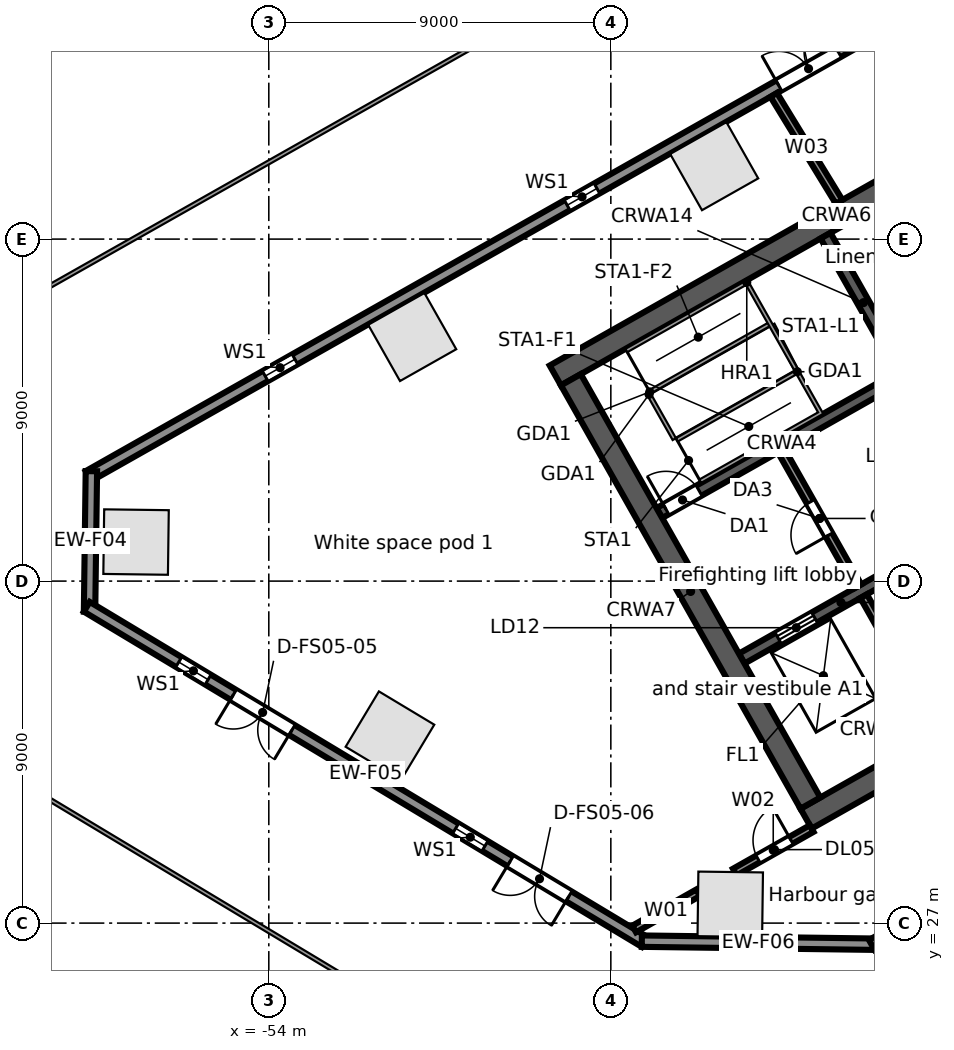
"""IFC4 building model, lengths in metres.
Left out: names, types, materials, properties, quantities, classifications, styles, units other than length and angle.
Written with IfcOpenShell. Run it as: python <this file> out.ifc"""

import sys

from ifc_helpers import new_model, si_unit, direction, frame, frame_2d, origin, origin_2d, place, context, subcontext, project, spatial, rectangle, extrude, element, fill, save


model = new_model("IFC4")
c1 = context("Model", 3, precision=1e-05, world=origin(), true_north=direction((0.0, 1.0)))
c2 = subcontext(c1, "Body", "Model", "MODEL_VIEW")
j1 = project(units=[si_unit("LENGTHUNIT", "METRE"), si_unit("PLANEANGLEUNIT", "RADIAN")], contexts=[c1])
p1 = place(None, origin())
s1 = spatial("IfcSite", under=j1, at=p1, CompositionType="ELEMENT")
p2 = place(p1, origin())
s2 = spatial("IfcBuilding", under=s1, at=p2, CompositionType="ELEMENT")
p3 = place(p2, frame((0.0, 0.0, 26.5)))
s3 = spatial("IfcBuildingStorey", under=s2, at=p3, CompositionType="ELEMENT", Elevation=26.5)
for number, where, z_axis, x_axis in (
    (1, (-42.28, 46.919, 0.0), (0.0, 0.0, 1.0), (-0.87, -0.492, 0.0)),
    (2, (-50.226, 42.423, 0.0), (0.0, 0.0, 1.0), (-0.87, -0.492, 0.0)),
    (3, (-57.493, 37.027, 0.0), (0.0, 0.0, 1.0), (-0.013, -1.0, 0.0)),
    (4, (-50.812, 31.931, 0.0), (0.0, 0.0, 1.0), (0.857, -0.515, 0.0)),
    (5, (-41.858, 27.495, 0.0), (0.0, 0.0, 1.0), (1.0, -0.013, 0.0)),
):
    element("IfcColumn", number, at=place(p3, frame(where, z_axis=z_axis, x_axis=x_axis)), inside=s3, PredefinedType="COLUMN", context=c2, shape_type="SweptSolid", body=[
        extrude(rectangle(XDim=1.7, YDim=1.7, at=origin_2d()), origin(), (0.0, 0.0, 1.0), 5.0),
    ])
p4 = place(p3, frame((-58.745, 38.764, 0.0), z_axis=(0.0, 0.0, 1.0), x_axis=(0.870355811726, 0.492423355453, 0.0)))
e6 = element("IfcWall", 6, at=p4, inside=s3, PredefinedType="STANDARD", context=c2, shape_type="SweptSolid", body=[
    extrude(rectangle(XDim=64.025, YDim=0.3, at=frame_2d((32.013, 0.0))), origin(), (0.0, 0.0, 1.0), 4.68),
])
p5 = place(p4, frame((60.122, 0.0, 0.6)))
e7 = element("IfcOpeningElement", 7, at=p5, cuts=e6, PredefinedType="OPENING", context=c2, shape_type="SweptSolid", body=[
    extrude(rectangle(XDim=0.9, YDim=3.2, at=frame_2d((0.45, 1.6))), frame((0.0, 0.16, 0.0), z_axis=(0.0, -1.0, 0.0), x_axis=(1.0, 0.0, 0.0)), (0.0, 0.0, 1.0), 0.32),
])
p6 = place(p4, frame((50.992, 0.0, 0.6)))
e8 = element("IfcOpeningElement", 8, at=p6, cuts=e6, PredefinedType="OPENING", context=c2, shape_type="SweptSolid", body=[
    extrude(rectangle(XDim=0.9, YDim=3.2, at=frame_2d((0.45, 1.6))), frame((0.0, 0.16, 0.0), z_axis=(0.0, -1.0, 0.0), x_axis=(1.0, 0.0, 0.0)), (0.0, 0.0, 1.0), 0.32),
])
p7 = place(p4, frame((41.862, 0.0, 0.6)))
e9 = element("IfcOpeningElement", 9, at=p7, cuts=e6, PredefinedType="OPENING", context=c2, shape_type="SweptSolid", body=[
    extrude(rectangle(XDim=0.9, YDim=3.2, at=frame_2d((0.45, 1.6))), frame((0.0, 0.16, 0.0), z_axis=(0.0, -1.0, 0.0), x_axis=(1.0, 0.0, 0.0)), (0.0, 0.0, 1.0), 0.32),
])
p8 = place(p4, frame((39.129, 0.0, 0.0)))
e10 = element("IfcOpeningElement", 10, at=p8, cuts=e6, PredefinedType="OPENING", context=c2, shape_type="SweptSolid", body=[
    extrude(rectangle(XDim=1.8, YDim=2.4, at=frame_2d((0.9, 1.2))), frame((0.0, 0.16, 0.0), z_axis=(0.0, -1.0, 0.0), x_axis=(1.0, 0.0, 0.0)), (0.0, 0.0, 1.0), 0.32),
])
p9 = place(p4, frame((32.732, 0.0, 0.6)))
e11 = element("IfcOpeningElement", 11, at=p9, cuts=e6, PredefinedType="OPENING", context=c2, shape_type="SweptSolid", body=[
    extrude(rectangle(XDim=0.9, YDim=3.2, at=frame_2d((0.45, 1.6))), frame((0.0, 0.16, 0.0), z_axis=(0.0, -1.0, 0.0), x_axis=(1.0, 0.0, 0.0)), (0.0, 0.0, 1.0), 0.32),
])
p10 = place(p4, frame((23.602, 0.0, 0.6)))
e12 = element("IfcOpeningElement", 12, at=p10, cuts=e6, PredefinedType="OPENING", context=c2, shape_type="SweptSolid", body=[
    extrude(rectangle(XDim=0.9, YDim=3.2, at=frame_2d((0.45, 1.6))), frame((0.0, 0.16, 0.0), z_axis=(0.0, -1.0, 0.0), x_axis=(1.0, 0.0, 0.0)), (0.0, 0.0, 1.0), 0.32),
])
p11 = place(p4, frame((20.87, 0.0, 0.0)))
e13 = element("IfcOpeningElement", 13, at=p11, cuts=e6, PredefinedType="OPENING", context=c2, shape_type="SweptSolid", body=[
    extrude(rectangle(XDim=1.8, YDim=2.4, at=frame_2d((0.9, 1.2))), frame((0.0, 0.16, 0.0), z_axis=(0.0, -1.0, 0.0), x_axis=(1.0, 0.0, 0.0)), (0.0, 0.0, 1.0), 0.32),
])
p12 = place(p4, frame((14.472, 0.0, 0.6)))
e14 = element("IfcOpeningElement", 14, at=p12, cuts=e6, PredefinedType="OPENING", context=c2, shape_type="SweptSolid", body=[
    extrude(rectangle(XDim=0.9, YDim=3.2, at=frame_2d((0.45, 1.6))), frame((0.0, 0.16, 0.0), z_axis=(0.0, -1.0, 0.0), x_axis=(1.0, 0.0, 0.0)), (0.0, 0.0, 1.0), 0.32),
])
p13 = place(p4, frame((5.342, 0.0, 0.6)))
e15 = element("IfcOpeningElement", 15, at=p13, cuts=e6, PredefinedType="OPENING", context=c2, shape_type="SweptSolid", body=[
    extrude(rectangle(XDim=0.9, YDim=3.2, at=frame_2d((0.45, 1.6))), frame((0.0, 0.16, 0.0), z_axis=(0.0, -1.0, 0.0), x_axis=(1.0, 0.0, 0.0)), (0.0, 0.0, 1.0), 0.32),
])
p14 = place(p3, frame((-58.717, 35.194, 0.0), z_axis=(0.0, 0.0, 1.0), x_axis=(0.013069053407, 0.999914596275, 0.0)))
e16 = element("IfcWall", 16, at=p14, inside=s3, PredefinedType="STANDARD", context=c2, shape_type="SweptSolid", body=[
    extrude(rectangle(XDim=3.699, YDim=0.3, at=frame_2d((1.849, 0.0))), origin(), (0.0, 0.0, 1.0), 4.68),
])
p15 = place(p3, frame((-44.109, 26.504, 0.0), z_axis=(0.0, 0.0, 1.0), x_axis=(-0.857169502585, 0.515034410344, 0.0)))
e17 = element("IfcWall", 17, at=p15, inside=s3, PredefinedType="STANDARD", context=c2, shape_type="SweptSolid", body=[
    extrude(rectangle(XDim=17.127, YDim=0.3, at=frame_2d((8.563, 0.0))), origin(), (0.0, 0.0, 1.0), 4.68),
])
p16 = place(p15, frame((13.403, 0.0, 0.6)))
e18 = element("IfcOpeningElement", 18, at=p16, cuts=e17, PredefinedType="OPENING", context=c2, shape_type="SweptSolid", body=[
    extrude(rectangle(XDim=0.9, YDim=3.2, at=frame_2d((0.45, 1.6))), frame((0.0, 0.16, 0.0), z_axis=(0.0, -1.0, 0.0), x_axis=(1.0, 0.0, 0.0)), (0.0, 0.0, 1.0), 0.32),
])
p17 = place(p15, frame((10.828, 0.0, 0.0)))
e19 = element("IfcOpeningElement", 19, at=p17, cuts=e17, PredefinedType="OPENING", context=c2, shape_type="SweptSolid", body=[
    extrude(rectangle(XDim=1.8, YDim=2.4, at=frame_2d((0.9, 1.2))), frame((0.0, 0.16, 0.0), z_axis=(0.0, -1.0, 0.0), x_axis=(1.0, 0.0, 0.0)), (0.0, 0.0, 1.0), 0.32),
])
p18 = place(p15, frame((4.903, 0.0, 0.6)))
e20 = element("IfcOpeningElement", 20, at=p18, cuts=e17, PredefinedType="OPENING", context=c2, shape_type="SweptSolid", body=[
    extrude(rectangle(XDim=0.9, YDim=3.2, at=frame_2d((0.45, 1.6))), frame((0.0, 0.16, 0.0), z_axis=(0.0, -1.0, 0.0), x_axis=(1.0, 0.0, 0.0)), (0.0, 0.0, 1.0), 0.32),
])
p19 = place(p15, frame((2.328, 0.0, 0.0)))
e21 = element("IfcOpeningElement", 21, at=p19, cuts=e17, PredefinedType="OPENING", context=c2, shape_type="SweptSolid", body=[
    extrude(rectangle(XDim=1.8, YDim=2.4, at=frame_2d((0.9, 1.2))), frame((0.0, 0.16, 0.0), z_axis=(0.0, -1.0, 0.0), x_axis=(1.0, 0.0, 0.0)), (0.0, 0.0, 1.0), 0.32),
])
p20 = place(p3, frame((-38.057, 26.445, 0.0), z_axis=(0.0, 0.0, 1.0), x_axis=(-0.999914086342, 0.013108010296, 0.0)))
e22 = element("IfcWall", 22, at=p20, inside=s3, PredefinedType="STANDARD", context=c2, shape_type="SweptSolid", body=[
    extrude(rectangle(XDim=6.128, YDim=0.3, at=frame_2d((3.064, 0.0))), origin(), (0.0, 0.0, 1.0), 4.68),
])
p21 = place(p3, frame((-0.055, 47.969, 0.0), z_axis=(0.0, 0.0, 1.0), x_axis=(-0.870355730478, -0.492423499058, 0.0)))
e23 = element("IfcWall", 23, at=p21, inside=s3, PredefinedType="STANDARD", context=c2, shape_type="SweptSolid", body=[
    extrude(rectangle(XDim=43.75, YDim=0.3, at=frame_2d((21.875, 0.0))), origin(), (0.0, 0.0, 1.0), 4.68),
])
p22 = place(p21, frame((39.977, 0.0, 0.6)))
e24 = element("IfcOpeningElement", 24, at=p22, cuts=e23, PredefinedType="OPENING", context=c2, shape_type="SweptSolid", body=[
    extrude(rectangle(XDim=0.9, YDim=3.2, at=frame_2d((0.45, 1.6))), frame((0.0, 0.16, 0.0), z_axis=(0.0, -1.0, 0.0), x_axis=(1.0, 0.0, 0.0)), (0.0, 0.0, 1.0), 0.32),
])
p23 = place(p21, frame((31.222, 0.0, 0.6)))
e25 = element("IfcOpeningElement", 25, at=p23, cuts=e23, PredefinedType="OPENING", context=c2, shape_type="SweptSolid", body=[
    extrude(rectangle(XDim=0.9, YDim=3.2, at=frame_2d((0.45, 1.6))), frame((0.0, 0.16, 0.0), z_axis=(0.0, -1.0, 0.0), x_axis=(1.0, 0.0, 0.0)), (0.0, 0.0, 1.0), 0.32),
])
p24 = place(p21, frame((28.584, 0.0, 0.0)))
e26 = element("IfcOpeningElement", 26, at=p24, cuts=e23, PredefinedType="OPENING", context=c2, shape_type="SweptSolid", body=[
    extrude(rectangle(XDim=1.8, YDim=2.4, at=frame_2d((0.9, 1.2))), frame((0.0, 0.16, 0.0), z_axis=(0.0, -1.0, 0.0), x_axis=(1.0, 0.0, 0.0)), (0.0, 0.0, 1.0), 0.32),
])
p25 = place(p21, frame((22.468, 0.0, 0.6)))
e27 = element("IfcOpeningElement", 27, at=p25, cuts=e23, PredefinedType="OPENING", context=c2, shape_type="SweptSolid", body=[
    extrude(rectangle(XDim=0.9, YDim=3.2, at=frame_2d((0.45, 1.6))), frame((0.0, 0.16, 0.0), z_axis=(0.0, -1.0, 0.0), x_axis=(1.0, 0.0, 0.0)), (0.0, 0.0, 1.0), 0.32),
])
p26 = place(p21, frame((13.713, 0.0, 0.6)))
e28 = element("IfcOpeningElement", 28, at=p26, cuts=e23, PredefinedType="OPENING", context=c2, shape_type="SweptSolid", body=[
    extrude(rectangle(XDim=0.9, YDim=3.2, at=frame_2d((0.45, 1.6))), frame((0.0, 0.16, 0.0), z_axis=(0.0, -1.0, 0.0), x_axis=(1.0, 0.0, 0.0)), (0.0, 0.0, 1.0), 0.32),
])
p27 = place(p21, frame((11.075, 0.0, 0.0)))
e29 = element("IfcOpeningElement", 29, at=p27, cuts=e23, PredefinedType="OPENING", context=c2, shape_type="SweptSolid", body=[
    extrude(rectangle(XDim=1.8, YDim=2.4, at=frame_2d((0.9, 1.2))), frame((0.0, 0.16, 0.0), z_axis=(0.0, -1.0, 0.0), x_axis=(1.0, 0.0, 0.0)), (0.0, 0.0, 1.0), 0.32),
])
p28 = place(p21, frame((4.959, 0.0, 0.6)))
e30 = element("IfcOpeningElement", 30, at=p28, cuts=e23, PredefinedType="OPENING", context=c2, shape_type="SweptSolid", body=[
    extrude(rectangle(XDim=0.9, YDim=3.2, at=frame_2d((0.45, 1.6))), frame((0.0, 0.16, 0.0), z_axis=(0.0, -1.0, 0.0), x_axis=(1.0, 0.0, 0.0)), (0.0, 0.0, 1.0), 0.32),
])
p29 = place(p3, frame((-39.862, 29.749, 0.0), z_axis=(0.0, 0.0, 1.0), x_axis=(0.870350116061, 0.492433422375, 0.0)))
e31 = element("IfcWall", 31, at=p29, inside=s3, PredefinedType="SOLIDWALL", context=c2, shape_type="SweptSolid", body=[
    extrude(rectangle(XDim=17.0, YDim=0.6, at=frame_2d((8.5, 0.0))), origin(), (0.0, 0.0, 1.0), 4.68),
])
p30 = place(p29, frame((7.2, 0.0, 0.0)))
e32 = element("IfcOpeningElement", 32, at=p30, cuts=e31, PredefinedType="OPENING", context=c2, shape_type="SweptSolid", body=[
    extrude(rectangle(XDim=1.2, YDim=2.1, at=frame_2d((0.6, 1.05))), frame((0.0, 0.31, 0.0), z_axis=(0.0, -1.0, 0.0), x_axis=(1.0, 0.0, 0.0)), (0.0, 0.0, 1.0), 0.62),
])
p31 = place(p3, frame((-41.556, 33.961, 0.0), z_axis=(0.0, 0.0, 1.0), x_axis=(0.870343731308, 0.492444706919, 0.0)))
e33 = element("IfcWall", 33, at=p31, inside=s3, PredefinedType="SOLIDWALL", context=c2, shape_type="SweptSolid", body=[
    extrude(rectangle(XDim=6.0, YDim=0.3, at=frame_2d((3.0, 0.0))), origin(), (0.0, 0.0, 1.0), 4.68),
])
p32 = place(p31, frame((1.1, 0.0, 0.0)))
e34 = element("IfcOpeningElement", 34, at=p32, cuts=e33, PredefinedType="OPENING", context=c2, shape_type="SweptSolid", body=[
    extrude(rectangle(XDim=1.1, YDim=2.1, at=frame_2d((0.55, 1.05))), frame((0.0, 0.16, 0.0), z_axis=(0.0, -1.0, 0.0), x_axis=(1.0, 0.0, 0.0)), (0.0, 0.0, 1.0), 0.32),
])
p33 = place(p31, frame((4.25, 0.0, 0.0)))
e35 = element("IfcOpeningElement", 35, at=p33, cuts=e33, PredefinedType="OPENING", context=c2, shape_type="SweptSolid", body=[
    extrude(rectangle(XDim=1.1, YDim=2.1, at=frame_2d((0.55, 1.05))), frame((0.0, 0.16, 0.0), z_axis=(0.0, -1.0, 0.0), x_axis=(1.0, 0.0, 0.0)), (0.0, 0.0, 1.0), 0.32),
])
p34 = place(p3, frame((-43.723, 37.791, 0.0), z_axis=(0.0, 0.0, 1.0), x_axis=(0.87035077051, 0.49243226567, 0.0)))
e36 = element("IfcWall", 36, at=p34, inside=s3, PredefinedType="SOLIDWALL", context=c2, shape_type="SweptSolid", body=[
    extrude(rectangle(XDim=7.4, YDim=0.3, at=frame_2d((3.7, 0.0))), origin(), (0.0, 0.0, 1.0), 4.68),
])
p35 = place(p34, frame((0.2, 0.0, 0.0)))
e37 = element("IfcOpeningElement", 37, at=p35, cuts=e36, PredefinedType="OPENING", context=c2, shape_type="SweptSolid", body=[
    extrude(rectangle(XDim=1.0, YDim=2.1, at=frame_2d((0.5, 1.05))), frame((0.0, 0.16, 0.0), z_axis=(0.0, -1.0, 0.0), x_axis=(1.0, 0.0, 0.0)), (0.0, 0.0, 1.0), 0.32),
])
p36 = place(p3, frame((-46.461, 41.412, 0.0), z_axis=(0.0, 0.0, 1.0), x_axis=(0.870350116061, 0.492433422375, 0.0)))
e38 = element("IfcWall", 38, at=p36, inside=s3, PredefinedType="SOLIDWALL", context=c2, shape_type="SweptSolid", body=[
    extrude(rectangle(XDim=17.0, YDim=0.6, at=frame_2d((8.5, 0.0))), origin(), (0.0, 0.0, 1.0), 4.68),
])
p37 = place(p3, frame((-46.052, 41.298, 0.0), z_axis=(0.0, 0.0, 1.0), x_axis=(0.492418598281, -0.870358503186, 0.0)))
e39 = element("IfcWall", 39, at=p37, inside=s3, PredefinedType="SOLIDWALL", context=c2, shape_type="SweptSolid", body=[
    extrude(rectangle(XDim=12.8, YDim=0.6, at=frame_2d((6.4, 0.0))), origin(), (0.0, 0.0, 1.0), 4.68),
])
p38 = place(p3, frame((-38.349, 35.603, 0.0), z_axis=(0.0, 0.0, 1.0), x_axis=(0.49241474071, -0.870360685654, 0.0)))
e40 = element("IfcWall", 40, at=p38, inside=s3, PredefinedType="SOLIDWALL", context=c2, shape_type="SweptSolid", body=[
    extrude(rectangle(XDim=4.05, YDim=0.2, at=frame_2d((2.025, 0.0))), origin(), (0.0, 0.0, 1.0), 4.68),
])
p39 = place(p3, frame((-40.516, 39.433, 0.0), z_axis=(0.0, 0.0, 1.0), x_axis=(0.492453559952, -0.87033872216, 0.0)))
e41 = element("IfcWall", 41, at=p39, inside=s3, PredefinedType="PARTITIONING", context=c2, shape_type="SweptSolid", body=[
    extrude(rectangle(XDim=4.1, YDim=0.2, at=frame_2d((2.05, 0.0))), origin(), (0.0, 0.0, 1.0), 4.68),
])
p40 = place(p39, frame((1.55, 0.0, 0.0)))
e42 = element("IfcOpeningElement", 42, at=p40, cuts=e41, PredefinedType="OPENING", context=c2, shape_type="SweptSolid", body=[
    extrude(rectangle(XDim=1.0, YDim=2.1, at=frame_2d((0.5, 1.05))), frame((0.0, 0.11, 0.0), z_axis=(0.0, -1.0, 0.0), x_axis=(1.0, 0.0, 0.0)), (0.0, 0.0, 1.0), 0.22),
])
p41 = place(p3, frame((-39.35, 45.09, 0.0), z_axis=(0.0, 0.0, 1.0), x_axis=(0.49241474071, -0.870360685654, 0.0)))
e43 = element("IfcWall", 43, at=p41, inside=s3, PredefinedType="SOLIDWALL", context=c2, shape_type="SweptSolid", body=[
    extrude(rectangle(XDim=4.05, YDim=0.3, at=frame_2d((2.025, 0.0))), origin(), (0.0, 0.0, 1.0), 4.68),
])
p42 = place(p3, frame((-44.386, 26.845, 0.0), z_axis=(0.0, 0.0, 1.0), x_axis=(0.870226201187, 0.492652371118, 0.0)))
e44 = element("IfcWall", 44, at=p42, inside=s3, PredefinedType="PARTITIONING", context=c2, shape_type="SweptSolid", body=[
    extrude(rectangle(XDim=1.933, YDim=0.2, at=frame_2d((0.966, 0.0))), origin(), (0.0, 0.0, 1.0), 4.68),
])
p43 = place(p3, frame((-41.738, 28.343, 0.0), z_axis=(0.0, 0.0, 1.0), x_axis=(0.870265350095, 0.492583211676, 0.0)))
e45 = element("IfcWall", 45, at=p43, inside=s3, PredefinedType="PARTITIONING", context=c2, shape_type="SweptSolid", body=[
    extrude(rectangle(XDim=2.324, YDim=0.2, at=frame_2d((1.162, 0.0))), origin(), (0.0, 0.0, 1.0), 4.68),
])
p44 = place(p43, frame((0.7, 0.0, 0.0)))
e46 = element("IfcOpeningElement", 46, at=p44, cuts=e45, PredefinedType="OPENING", context=c2, shape_type="SweptSolid", body=[
    extrude(rectangle(XDim=1.0, YDim=2.1, at=frame_2d((0.5, 1.05))), frame((0.0, 0.11, 0.0), z_axis=(0.0, -1.0, 0.0), x_axis=(1.0, 0.0, 0.0)), (0.0, 0.0, 1.0), 0.22),
])
p45 = place(p3, frame((-40.713, 48.794, 0.0), z_axis=(0.0, 0.0, 1.0), x_axis=(0.52165366254, -0.853157345604, 0.0)))
e47 = element("IfcWall", 47, at=p45, inside=s3, PredefinedType="PARTITIONING", context=c2, shape_type="SweptSolid", body=[
    extrude(rectangle(XDim=3.297, YDim=0.2, at=frame_2d((1.648, 0.0))), origin(), (0.0, 0.0, 1.0), 3.96),
])
p46 = place(p11, origin())
e48 = element("IfcDoor", 48, at=p46, inside=s3, OperationType="DOUBLE_DOOR_SINGLE_SWING", PredefinedType="DOOR", context=c2, shape_type="SweptSolid", body=[
    extrude(rectangle(XDim=1.8, YDim=2.4, at=frame_2d((0.9, 1.2))), frame((0.0, 0.025, 0.0), z_axis=(0.0, -1.0, 0.0), x_axis=(1.0, 0.0, 0.0)), (0.0, 0.0, 1.0), 0.05),
])
fill(e13, e48)
p47 = place(p12, origin())
e49 = element("IfcWindow", 49, at=p47, inside=s3, PartitioningType="SINGLE_PANEL", PredefinedType="WINDOW", context=c2, shape_type="SweptSolid", body=[
    extrude(rectangle(XDim=0.9, YDim=3.2, at=frame_2d((0.45, 1.6))), frame((0.0, 0.03, 0.0), z_axis=(0.0, -1.0, 0.0), x_axis=(1.0, 0.0, 0.0)), (0.0, 0.0, 1.0), 0.06),
])
fill(e14, e49)
p48 = place(p13, origin())
e50 = element("IfcWindow", 50, at=p48, inside=s3, PartitioningType="SINGLE_PANEL", PredefinedType="WINDOW", context=c2, shape_type="SweptSolid", body=[
    extrude(rectangle(XDim=0.9, YDim=3.2, at=frame_2d((0.45, 1.6))), frame((0.0, 0.03, 0.0), z_axis=(0.0, -1.0, 0.0), x_axis=(1.0, 0.0, 0.0)), (0.0, 0.0, 1.0), 0.06),
])
fill(e15, e50)
p49 = place(p16, origin())
e51 = element("IfcWindow", 51, at=p49, inside=s3, PartitioningType="SINGLE_PANEL", PredefinedType="WINDOW", context=c2, shape_type="SweptSolid", body=[
    extrude(rectangle(XDim=0.9, YDim=3.2, at=frame_2d((0.45, 1.6))), frame((0.0, 0.03, 0.0), z_axis=(0.0, -1.0, 0.0), x_axis=(1.0, 0.0, 0.0)), (0.0, 0.0, 1.0), 0.06),
])
fill(e18, e51)
p50 = place(p17, origin())
e52 = element("IfcDoor", 52, at=p50, inside=s3, OperationType="DOUBLE_DOOR_SINGLE_SWING", PredefinedType="DOOR", context=c2, shape_type="SweptSolid", body=[
    extrude(rectangle(XDim=1.8, YDim=2.4, at=frame_2d((0.9, 1.2))), frame((0.0, 0.025, 0.0), z_axis=(0.0, -1.0, 0.0), x_axis=(1.0, 0.0, 0.0)), (0.0, 0.0, 1.0), 0.05),
])
fill(e19, e52)
p51 = place(p18, origin())
e53 = element("IfcWindow", 53, at=p51, inside=s3, PartitioningType="SINGLE_PANEL", PredefinedType="WINDOW", context=c2, shape_type="SweptSolid", body=[
    extrude(rectangle(XDim=0.9, YDim=3.2, at=frame_2d((0.45, 1.6))), frame((0.0, 0.03, 0.0), z_axis=(0.0, -1.0, 0.0), x_axis=(1.0, 0.0, 0.0)), (0.0, 0.0, 1.0), 0.06),
])
fill(e20, e53)
p52 = place(p19, origin())
e54 = element("IfcDoor", 54, at=p52, inside=s3, OperationType="DOUBLE_DOOR_SINGLE_SWING", PredefinedType="DOOR", context=c2, shape_type="SweptSolid", body=[
    extrude(rectangle(XDim=1.8, YDim=2.4, at=frame_2d((0.9, 1.2))), frame((0.0, 0.025, 0.0), z_axis=(0.0, -1.0, 0.0), x_axis=(1.0, 0.0, 0.0)), (0.0, 0.0, 1.0), 0.05),
])
fill(e21, e54)
p53 = place(p32, origin())
e55 = element("IfcDoor", 55, at=p53, inside=s3, OperationType="DOUBLE_DOOR_SLIDING", PredefinedType="DOOR", context=c2, shape_type="SweptSolid", body=[
    extrude(rectangle(XDim=1.1, YDim=2.1, at=frame_2d((0.55, 1.05))), frame((0.0, 0.025, 0.0), z_axis=(0.0, -1.0, 0.0), x_axis=(1.0, 0.0, 0.0)), (0.0, 0.0, 1.0), 0.05),
])
fill(e34, e55)
p54 = place(p35, origin())
e56 = element("IfcDoor", 56, at=p54, inside=s3, OperationType="SINGLE_SWING_LEFT", PredefinedType="DOOR", context=c2, shape_type="SweptSolid", body=[
    extrude(rectangle(XDim=1.0, YDim=2.1, at=frame_2d((0.5, 1.05))), frame((0.0, 0.025, 0.0), z_axis=(0.0, -1.0, 0.0), x_axis=(1.0, 0.0, 0.0)), (0.0, 0.0, 1.0), 0.05),
])
fill(e37, e56)
p55 = place(p40, frame((1.0, 0.0, 0.0), z_axis=(0.0, 0.0, 1.0), x_axis=(-1.0, 0.0, 0.0)))
e57 = element("IfcDoor", 57, at=p55, inside=s3, OperationType="SINGLE_SWING_LEFT", PredefinedType="DOOR", context=c2, shape_type="SweptSolid", body=[
    extrude(rectangle(XDim=1.0, YDim=2.1, at=frame_2d((0.5, 1.05))), frame((0.0, 0.025, 0.0), z_axis=(0.0, -1.0, 0.0), x_axis=(1.0, 0.0, 0.0)), (0.0, 0.0, 1.0), 0.05),
])
fill(e42, e57)
p56 = place(p44, origin())
e58 = element("IfcDoor", 58, at=p56, inside=s3, OperationType="SINGLE_SWING_RIGHT", PredefinedType="DOOR", context=c2, shape_type="SweptSolid", body=[
    extrude(rectangle(XDim=1.0, YDim=2.1, at=frame_2d((0.5, 1.05))), frame((0.0, 0.025, 0.0), z_axis=(0.0, -1.0, 0.0), x_axis=(1.0, 0.0, 0.0)), (0.0, 0.0, 1.0), 0.05),
])
fill(e46, e58)
save(model, sys.argv[1])
